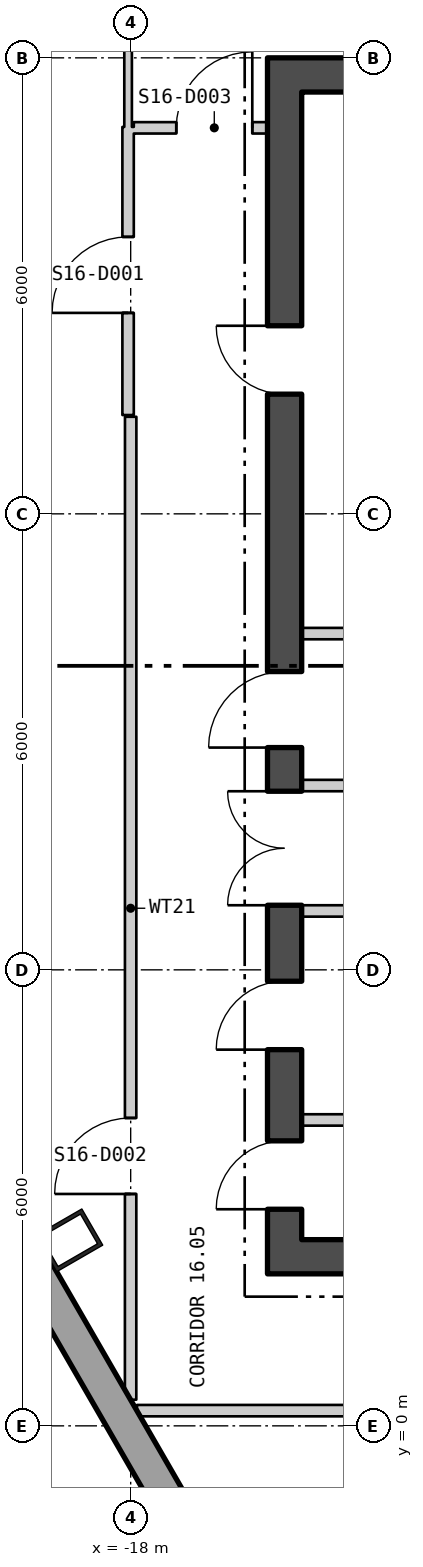
"""IFC4 building model, lengths in metres.
Left out: names, types, materials, properties, quantities, classifications, styles, units other than length and angle.
Written with IfcOpenShell. Run it as: python <this file> out.ifc"""

import sys

from ifc_helpers import new_model, si_unit, direction, frame, frame_2d, origin, origin_2d, place, context, subcontext, project, spatial, polyline, rectangle, hollow_rectangle, outline, extrude, element, fill, save


model = new_model("IFC4")
c1 = context("Model", 3, precision=1e-05, world=origin(), true_north=direction((0.0, 1.0)))
c2 = subcontext(c1, "Body", "Model", "MODEL_VIEW")
j1 = project(units=[si_unit("LENGTHUNIT", "METRE"), si_unit("PLANEANGLEUNIT", "RADIAN")], contexts=[c1])
p1 = place(None, origin())
s1 = spatial("IfcSite", under=j1, at=p1, CompositionType="ELEMENT")
p2 = place(p1, origin())
s2 = spatial("IfcBuilding", under=s1, at=p2, CompositionType="ELEMENT")
p3 = place(p2, frame((0.0, 0.0, 216.0)))
s3 = spatial("IfcBuildingStorey", under=s2, at=p3, CompositionType="ELEMENT", Elevation=216.0)
p4 = place(p3, frame((-18.808, 2.441, 0.0), z_axis=(0.0, 0.0, 1.0), x_axis=(0.5, -0.866025403784, 0.0)))
e1 = element("IfcColumn", 1, at=p4, inside=s3, PredefinedType="COLUMN", context=c2, shape_type="SweptSolid", body=[
    extrude(hollow_rectangle(XDim=0.55, YDim=0.7, WallThickness=0.05, at=origin_2d()), origin(), (0.0, 0.0, 1.0), 3.9),
])
p5 = place(p3, frame((-26.235, 14.155, -0.18), z_axis=(0.0, 0.0, 1.0), x_axis=(0.500000335318, -0.866025210188, 0.0)))
e2 = element("IfcWall", 2, at=p5, inside=s3, PredefinedType="SOLIDWALL", context=c2, shape_type="SweptSolid", body=[
    extrude(outline(polyline([(-0.13, -0.225), (45.88, -0.225), (45.62, 0.225), (0.13, 0.225), (-0.13, -0.225)])), origin(), (0.0, 0.0, 1.0), 3.68),
])
p6 = place(p5, frame((1.425, 0.0, 1.08)))
e3 = element("IfcOpeningElement", 3, at=p6, cuts=e2, PredefinedType="OPENING", context=c2, shape_type="SweptSolid", body=[
    extrude(rectangle(XDim=2.4, YDim=2.0, at=frame_2d((1.2, 1.0))), frame((0.0, 0.235, 0.0), z_axis=(0.0, -1.0, 0.0), x_axis=(1.0, 0.0, 0.0)), (0.0, 0.0, 1.0), 0.47),
])
p7 = place(p5, frame((5.895, 0.0, 1.08)))
e4 = element("IfcOpeningElement", 4, at=p7, cuts=e2, PredefinedType="OPENING", context=c2, shape_type="SweptSolid", body=[
    extrude(rectangle(XDim=2.4, YDim=2.0, at=frame_2d((1.2, 1.0))), frame((0.0, 0.235, 0.0), z_axis=(0.0, -1.0, 0.0), x_axis=(1.0, 0.0, 0.0)), (0.0, 0.0, 1.0), 0.47),
])
p8 = place(p5, frame((10.403, 0.0, 1.08)))
e5 = element("IfcOpeningElement", 5, at=p8, cuts=e2, PredefinedType="OPENING", context=c2, shape_type="SweptSolid", body=[
    extrude(rectangle(XDim=2.4, YDim=2.0, at=frame_2d((1.2, 1.0))), frame((0.0, 0.235, 0.0), z_axis=(0.0, -1.0, 0.0), x_axis=(1.0, 0.0, 0.0)), (0.0, 0.0, 1.0), 0.47),
])
p9 = place(p5, frame((19.421, 0.0, 1.08)))
e6 = element("IfcOpeningElement", 6, at=p9, cuts=e2, PredefinedType="OPENING", context=c2, shape_type="SweptSolid", body=[
    extrude(rectangle(XDim=2.4, YDim=2.0, at=frame_2d((1.2, 1.0))), frame((0.0, 0.235, 0.0), z_axis=(0.0, -1.0, 0.0), x_axis=(1.0, 0.0, 0.0)), (0.0, 0.0, 1.0), 0.47),
])
p10 = place(p5, frame((23.929, 0.0, 1.08)))
e7 = element("IfcOpeningElement", 7, at=p10, cuts=e2, PredefinedType="OPENING", context=c2, shape_type="SweptSolid", body=[
    extrude(rectangle(XDim=2.4, YDim=2.0, at=frame_2d((1.2, 1.0))), frame((0.0, 0.235, 0.0), z_axis=(0.0, -1.0, 0.0), x_axis=(1.0, 0.0, 0.0)), (0.0, 0.0, 1.0), 0.47),
])
p11 = place(p5, frame((28.438, 0.0, 1.08)))
e8 = element("IfcOpeningElement", 8, at=p11, cuts=e2, PredefinedType="OPENING", context=c2, shape_type="SweptSolid", body=[
    extrude(rectangle(XDim=2.4, YDim=2.0, at=frame_2d((1.2, 1.0))), frame((0.0, 0.235, 0.0), z_axis=(0.0, -1.0, 0.0), x_axis=(1.0, 0.0, 0.0)), (0.0, 0.0, 1.0), 0.47),
])
p12 = place(p5, frame((32.947, 0.0, 1.08)))
e9 = element("IfcOpeningElement", 9, at=p12, cuts=e2, PredefinedType="OPENING", context=c2, shape_type="SweptSolid", body=[
    extrude(rectangle(XDim=2.4, YDim=2.0, at=frame_2d((1.2, 1.0))), frame((0.0, 0.235, 0.0), z_axis=(0.0, -1.0, 0.0), x_axis=(1.0, 0.0, 0.0)), (0.0, 0.0, 1.0), 0.47),
])
p13 = place(p5, frame((41.925, 0.0, 1.08)))
e10 = element("IfcOpeningElement", 10, at=p13, cuts=e2, PredefinedType="OPENING", context=c2, shape_type="SweptSolid", body=[
    extrude(rectangle(XDim=2.4, YDim=2.0, at=frame_2d((1.2, 1.0))), frame((0.0, 0.235, 0.0), z_axis=(0.0, -1.0, 0.0), x_axis=(1.0, 0.0, 0.0)), (0.0, 0.0, 1.0), 0.47),
])
p14 = place(p3, frame((-16.2, 2.225, 0.0), z_axis=(0.0, 0.0, 1.0), x_axis=(1.0, 0.0, 0.0)))
e11 = element("IfcWall", 11, at=p14, inside=s3, PredefinedType="SHEAR", context=c2, shape_type="SweptSolid", body=[
    extrude(rectangle(XDim=32.4, YDim=0.45, at=frame_2d((16.2, 0.0))), origin(), (0.0, 0.0, 1.0), 3.7),
])
p15 = place(p14, frame((10.7, 0.0, 0.0)))
e12 = element("IfcOpeningElement", 12, at=p15, cuts=e11, PredefinedType="OPENING", context=c2, shape_type="SweptSolid", body=[
    extrude(rectangle(XDim=1.8, YDim=2.4, at=frame_2d((0.9, 1.2))), frame((0.0, 0.235, 0.0), z_axis=(0.0, -1.0, 0.0), x_axis=(1.0, 0.0, 0.0)), (0.0, 0.0, 1.0), 0.47),
])
p16 = place(p14, frame((20.7, 0.0, 0.0)))
e13 = element("IfcOpeningElement", 13, at=p16, cuts=e11, PredefinedType="OPENING", context=c2, shape_type="SweptSolid", body=[
    extrude(rectangle(XDim=1.8, YDim=2.4, at=frame_2d((0.9, 1.2))), frame((0.0, 0.235, 0.0), z_axis=(0.0, -1.0, 0.0), x_axis=(1.0, 0.0, 0.0)), (0.0, 0.0, 1.0), 0.47),
])
p17 = place(p3, frame((-16.2, 17.775, 0.0), z_axis=(0.0, 0.0, 1.0), x_axis=(1.0, 0.0, 0.0)))
e14 = element("IfcWall", 14, at=p17, inside=s3, PredefinedType="SHEAR", context=c2, shape_type="SweptSolid", body=[
    extrude(rectangle(XDim=32.4, YDim=0.45, at=frame_2d((16.2, 0.0))), origin(), (0.0, 0.0, 1.0), 3.7),
])
p18 = place(p3, frame((-15.975, 2.45, 0.0), z_axis=(0.0, 0.0, 1.0), x_axis=(0.0, 1.0, 0.0)))
e15 = element("IfcWall", 15, at=p18, inside=s3, PredefinedType="SHEAR", context=c2, shape_type="SweptSolid", body=[
    extrude(rectangle(XDim=15.1, YDim=0.45, at=frame_2d((7.55, 0.0))), origin(), (0.0, 0.0, 1.0), 3.7),
])
p19 = place(p18, frame((4.4, 0.0, 0.0)))
e16 = element("IfcOpeningElement", 16, at=p19, cuts=e15, PredefinedType="OPENING", context=c2, shape_type="SweptSolid", body=[
    extrude(rectangle(XDim=1.5, YDim=2.1, at=frame_2d((0.75, 1.05))), frame((0.0, 0.235, 0.0), z_axis=(0.0, -1.0, 0.0), x_axis=(1.0, 0.0, 0.0)), (0.0, 0.0, 1.0), 0.47),
])
p20 = place(p18, frame((0.4, 0.0, 0.0)))
e17 = element("IfcOpeningElement", 17, at=p20, cuts=e15, PredefinedType="OPENING", context=c2, shape_type="SweptSolid", body=[
    extrude(rectangle(XDim=0.9, YDim=2.1, at=frame_2d((0.45, 1.05))), frame((0.0, 0.235, 0.0), z_axis=(0.0, -1.0, 0.0), x_axis=(1.0, 0.0, 0.0)), (0.0, 0.0, 1.0), 0.47),
])
p21 = place(p18, frame((2.5, 0.0, 0.0)))
e18 = element("IfcOpeningElement", 18, at=p21, cuts=e15, PredefinedType="OPENING", context=c2, shape_type="SweptSolid", body=[
    extrude(rectangle(XDim=0.9, YDim=2.1, at=frame_2d((0.45, 1.05))), frame((0.0, 0.235, 0.0), z_axis=(0.0, -1.0, 0.0), x_axis=(1.0, 0.0, 0.0)), (0.0, 0.0, 1.0), 0.47),
])
p22 = place(p18, frame((6.475, 0.0, 0.0)))
e19 = element("IfcOpeningElement", 19, at=p22, cuts=e15, PredefinedType="OPENING", context=c2, shape_type="SweptSolid", body=[
    extrude(rectangle(XDim=1.0, YDim=2.1, at=frame_2d((0.5, 1.05))), frame((0.0, 0.235, 0.0), z_axis=(0.0, -1.0, 0.0), x_axis=(1.0, 0.0, 0.0)), (0.0, 0.0, 1.0), 0.47),
])
p23 = place(p18, frame((11.125, 0.0, 0.0)))
e20 = element("IfcOpeningElement", 20, at=p23, cuts=e15, PredefinedType="OPENING", context=c2, shape_type="SweptSolid", body=[
    extrude(rectangle(XDim=0.9, YDim=2.1, at=frame_2d((0.45, 1.05))), frame((0.0, 0.235, 0.0), z_axis=(0.0, -1.0, 0.0), x_axis=(1.0, 0.0, 0.0)), (0.0, 0.0, 1.0), 0.47),
])
for number, where, z_axis, x_axis in (
    (21, (-15.75, 6.775, 0.0), (0.0, 0.0, 1.0), (1.0, 0.0, 0.0)),
    (22, (-15.75, 8.425, 0.0), (0.0, 0.0, 1.0), (1.0, 0.0, 0.0)),
    (23, (-15.75, 4.025, 0.0), (0.0, 0.0, 1.0), (1.0, 0.0, 0.0)),
    (24, (-15.75, 10.424, 0.0), (0.0, 0.0, 1.0), (1.0, 0.0, 0.0)),
):
    element("IfcWall", number, at=place(p3, frame(where, z_axis=z_axis, x_axis=x_axis)), inside=s3, PredefinedType="PARTITIONING", context=c2, shape_type="SweptSolid", body=[
        extrude(rectangle(XDim=1.25, YDim=0.15, at=frame_2d((0.625, 0.0))), origin(), (0.0, 0.0, 1.0), 3.7),
    ])
p24 = place(p3, frame((-18.034, 13.3, 0.0), z_axis=(0.0, 0.0, 1.0), x_axis=(0.0, 1.0, 0.0)))
e25 = element("IfcWall", 25, at=p24, inside=s3, PredefinedType="PARTITIONING", context=c2, shape_type="SweptSolid", body=[
    extrude(rectangle(XDim=3.791, YDim=0.15, at=frame_2d((1.895, 0.0))), origin(), (0.0, 0.0, 1.0), 3.7),
])
p25 = place(p24, frame((1.344, 0.0, 0.0)))
e26 = element("IfcOpeningElement", 26, at=p25, cuts=e25, PredefinedType="OPENING", context=c2, shape_type="SweptSolid", body=[
    extrude(rectangle(XDim=1.0, YDim=2.1, at=frame_2d((0.5, 1.05))), frame((0.0, 0.085, 0.0), z_axis=(0.0, -1.0, 0.0), x_axis=(1.0, 0.0, 0.0)), (0.0, 0.0, 1.0), 0.17),
])
p26 = place(p3, frame((-18.034, 17.091, 0.0), z_axis=(0.0, 0.0, 1.0), x_axis=(0.0, 1.0, 0.0)))
e27 = element("IfcWall", 27, at=p26, inside=s3, PredefinedType="PARTITIONING", context=c2, shape_type="SweptSolid", body=[
    extrude(rectangle(XDim=2.209, YDim=0.1, at=frame_2d((1.105, 0.0))), origin(), (0.0, 0.0, 1.0), 3.7),
])
p27 = place(p3, frame((-18.001, 0.344, 0.0), z_axis=(0.0, 0.0, 1.0), x_axis=(7.732158e-05, 0.999999997011, 0.0)))
e28 = element("IfcWall", 28, at=p27, inside=s3, PredefinedType="PARTITIONING", context=c2, shape_type="SweptSolid", body=[
    extrude(rectangle(XDim=12.933, YDim=0.15, at=frame_2d((6.466, 0.0))), origin(), (0.0, 0.0, 1.0), 3.7),
])
p28 = place(p27, frame((2.707, 0.0, 0.0)))
e29 = element("IfcOpeningElement", 29, at=p28, cuts=e28, PredefinedType="OPENING", context=c2, shape_type="SweptSolid", body=[
    extrude(rectangle(XDim=1.0, YDim=2.1, at=frame_2d((0.5, 1.05))), frame((0.0, 0.085, 0.0), z_axis=(0.0, -1.0, 0.0), x_axis=(1.0, 0.0, 0.0)), (0.0, 0.0, 1.0), 0.17),
])
p29 = place(p3, frame((-17.959, 17.079, 0.0), z_axis=(0.0, 0.0, 1.0), x_axis=(1.0, 0.0, 0.0)))
e30 = element("IfcWall", 30, at=p29, inside=s3, PredefinedType="PARTITIONING", context=c2, shape_type="SweptSolid", body=[
    extrude(rectangle(XDim=1.759, YDim=0.15, at=frame_2d((0.879, 0.0))), origin(), (0.0, 0.0, 1.0), 3.7),
])
p30 = place(p29, frame((0.559, 0.0, 0.0)))
e31 = element("IfcOpeningElement", 31, at=p30, cuts=e30, PredefinedType="OPENING", context=c2, shape_type="SweptSolid", body=[
    extrude(rectangle(XDim=1.0, YDim=2.1, at=frame_2d((0.5, 1.05))), frame((0.0, 0.085, 0.0), z_axis=(0.0, -1.0, 0.0), x_axis=(1.0, 0.0, 0.0)), (0.0, 0.0, 1.0), 0.17),
])
p31 = place(p3, frame((-17.918, 0.2, 0.0), z_axis=(0.0, 0.0, 1.0), x_axis=(0.999999995937, 9.0146939e-05, 0.0)))
e32 = element("IfcWall", 32, at=p31, inside=s3, PredefinedType="PARTITIONING", context=c2, shape_type="SweptSolid", body=[
    extrude(rectangle(XDim=11.093, YDim=0.15, at=frame_2d((5.546, 0.0))), origin(), (0.0, 0.0, 1.0), 3.7),
])
p32 = place(p31, frame((9.73, 0.0, 0.0)))
e33 = element("IfcOpeningElement", 33, at=p32, cuts=e32, PredefinedType="OPENING", context=c2, shape_type="SweptSolid", body=[
    extrude(rectangle(XDim=1.0, YDim=2.1, at=frame_2d((0.5, 1.05))), frame((0.0, 0.085, 0.0), z_axis=(0.0, -1.0, 0.0), x_axis=(1.0, 0.0, 0.0)), (0.0, 0.0, 1.0), 0.17),
])
p33 = place(p19, origin())
e34 = element("IfcDoor", 34, at=p33, inside=s3, OperationType="DOUBLE_DOOR_SINGLE_SWING", PredefinedType="DOOR", context=c2, shape_type="SweptSolid", body=[
    extrude(rectangle(XDim=1.5, YDim=2.1, at=frame_2d((0.75, 1.05))), frame((0.0, 0.025, 0.0), z_axis=(0.0, -1.0, 0.0), x_axis=(1.0, 0.0, 0.0)), (0.0, 0.0, 1.0), 0.05),
])
fill(e16, e34)
p34 = place(p20, origin())
e35 = element("IfcDoor", 35, at=p34, inside=s3, OperationType="SINGLE_SWING_RIGHT", PredefinedType="DOOR", context=c2, shape_type="SweptSolid", body=[
    extrude(rectangle(XDim=0.9, YDim=2.1, at=frame_2d((0.45, 1.05))), frame((0.0, 0.025, 0.0), z_axis=(0.0, -1.0, 0.0), x_axis=(1.0, 0.0, 0.0)), (0.0, 0.0, 1.0), 0.05),
])
fill(e17, e35)
p35 = place(p21, origin())
e36 = element("IfcDoor", 36, at=p35, inside=s3, OperationType="SINGLE_SWING_RIGHT", PredefinedType="DOOR", context=c2, shape_type="SweptSolid", body=[
    extrude(rectangle(XDim=0.9, YDim=2.1, at=frame_2d((0.45, 1.05))), frame((0.0, 0.025, 0.0), z_axis=(0.0, -1.0, 0.0), x_axis=(1.0, 0.0, 0.0)), (0.0, 0.0, 1.0), 0.05),
])
fill(e18, e36)
p36 = place(p22, origin())
e37 = element("IfcDoor", 37, at=p36, inside=s3, OperationType="SINGLE_SWING_RIGHT", PredefinedType="DOOR", context=c2, shape_type="SweptSolid", body=[
    extrude(rectangle(XDim=1.0, YDim=2.1, at=frame_2d((0.5, 1.05))), frame((0.0, 0.025, 0.0), z_axis=(0.0, -1.0, 0.0), x_axis=(1.0, 0.0, 0.0)), (0.0, 0.0, 1.0), 0.05),
])
fill(e19, e37)
p37 = place(p23, origin())
e38 = element("IfcDoor", 38, at=p37, inside=s3, OperationType="SINGLE_SWING_LEFT", PredefinedType="DOOR", context=c2, shape_type="SweptSolid", body=[
    extrude(rectangle(XDim=0.9, YDim=2.1, at=frame_2d((0.45, 1.05))), frame((0.0, 0.025, 0.0), z_axis=(0.0, -1.0, 0.0), x_axis=(1.0, 0.0, 0.0)), (0.0, 0.0, 1.0), 0.05),
])
fill(e20, e38)
p38 = place(p25, origin())
e39 = element("IfcDoor", 39, at=p38, inside=s3, OperationType="SINGLE_SWING_RIGHT", PredefinedType="DOOR", context=c2, shape_type="SweptSolid", body=[
    extrude(rectangle(XDim=1.0, YDim=2.1, at=frame_2d((0.5, 1.05))), frame((0.0, 0.025, 0.0), z_axis=(0.0, -1.0, 0.0), x_axis=(1.0, 0.0, 0.0)), (0.0, 0.0, 1.0), 0.05),
])
fill(e26, e39)
p39 = place(p28, origin())
e40 = element("IfcDoor", 40, at=p39, inside=s3, OperationType="SINGLE_SWING_RIGHT", PredefinedType="DOOR", context=c2, shape_type="SweptSolid", body=[
    extrude(rectangle(XDim=1.0, YDim=2.1, at=frame_2d((0.5, 1.05))), frame((0.0, 0.025, 0.0), z_axis=(0.0, -1.0, 0.0), x_axis=(1.0, 0.0, 0.0)), (0.0, 0.0, 1.0), 0.05),
])
fill(e29, e40)
p40 = place(p30, origin())
e41 = element("IfcDoor", 41, at=p40, inside=s3, OperationType="SINGLE_SWING_LEFT", PredefinedType="DOOR", context=c2, shape_type="SweptSolid", body=[
    extrude(rectangle(XDim=1.0, YDim=2.1, at=frame_2d((0.5, 1.05))), frame((0.0, 0.025, 0.0), z_axis=(0.0, -1.0, 0.0), x_axis=(1.0, 0.0, 0.0)), (0.0, 0.0, 1.0), 0.05),
])
fill(e31, e41)
save(model, sys.argv[1])
